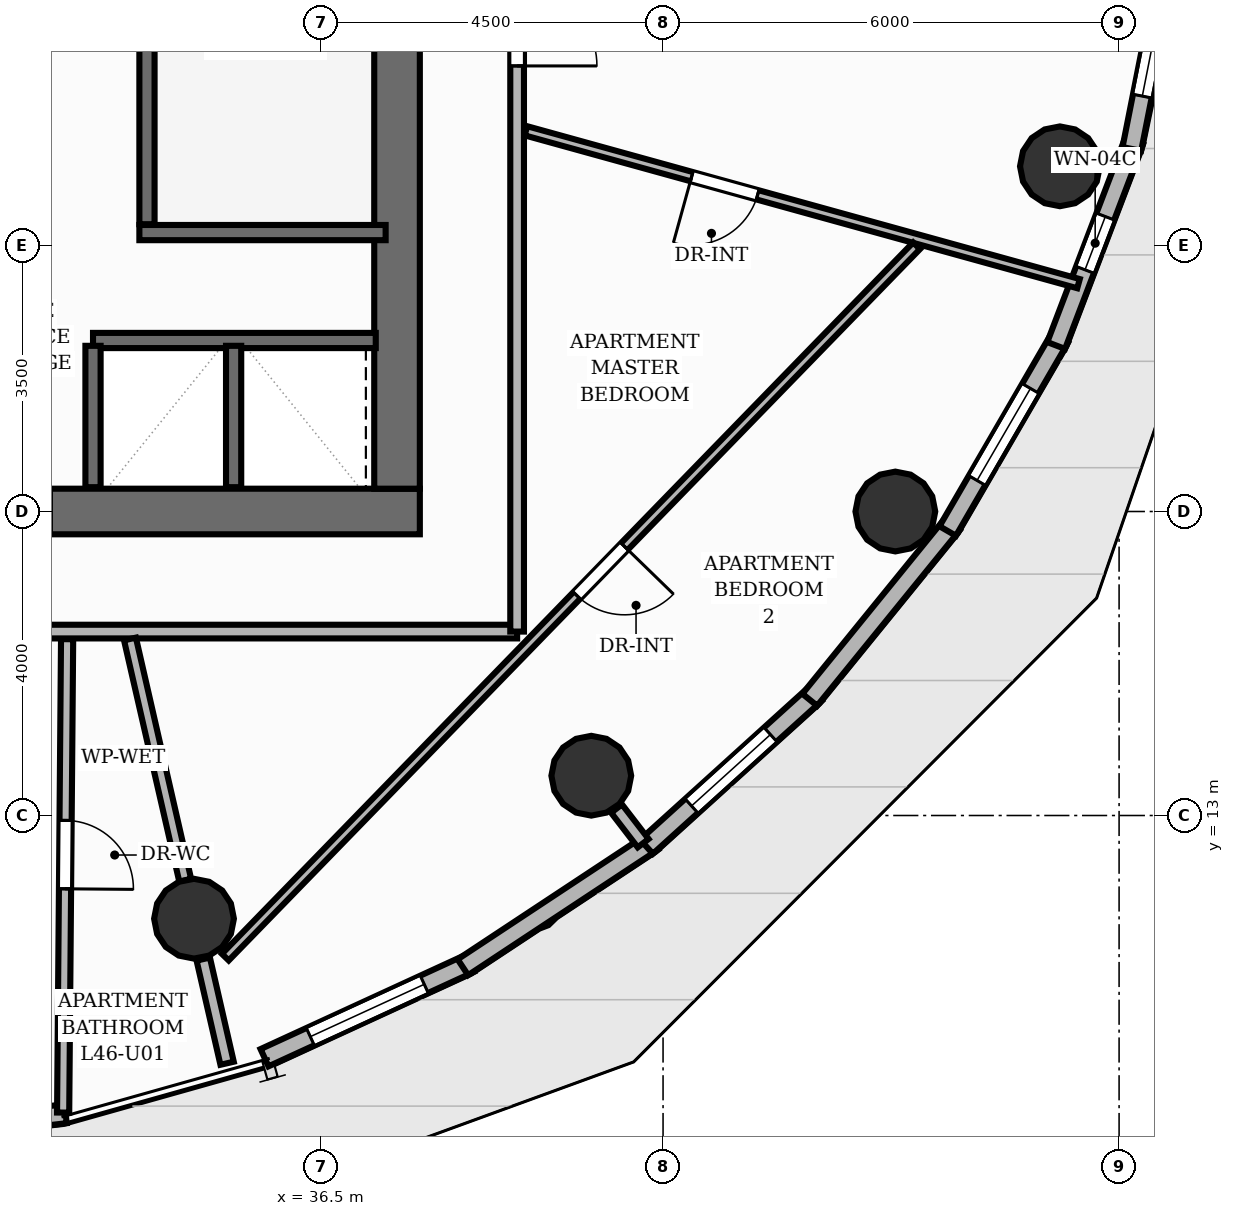
"""IFC4 building model, lengths in metres.
Left out: names, types, materials, properties, quantities, classifications, styles, units other than length and angle.
Written with IfcOpenShell. Run it as: python <this file> out.ifc"""

import sys

from ifc_helpers import new_model, si_unit, direction, frame, frame_2d, origin, origin_2d, place, context, subcontext, project, spatial, rectangle, circle, extrude, element, fill, save


model = new_model("IFC4")
c1 = context("Model", 3, precision=1e-05, world=origin(), true_north=direction((0.0, 1.0)))
c2 = subcontext(c1, "Body", "Model", "MODEL_VIEW")
j1 = project(units=[si_unit("LENGTHUNIT", "METRE"), si_unit("PLANEANGLEUNIT", "RADIAN")], contexts=[c1])
p1 = place(None, origin())
s1 = spatial("IfcSite", under=j1, at=p1, CompositionType="ELEMENT")
p2 = place(p1, origin())
s2 = spatial("IfcBuilding", under=s1, at=p2, CompositionType="ELEMENT")
p3 = place(p2, frame((0.0, 0.0, 155.36)))
s3 = spatial("IfcBuildingStorey", under=s2, at=p3, CompositionType="ELEMENT", Elevation=155.36)
p4 = place(p3, frame((22.7, 17.0, 0.0), z_axis=(0.0, 0.0, 1.0), x_axis=(1.0, 0.0, 0.0)))
e1 = element("IfcWall", 1, at=p4, inside=s3, PredefinedType="SHEAR", context=c2, shape_type="SweptSolid", body=[
    extrude(rectangle(XDim=15.1, YDim=0.6, at=frame_2d((7.55, 0.0))), origin(), (0.0, 0.0, 1.0), 3.2),
])
p5 = place(p4, frame((5.8, 0.0, 0.0)))
e2 = element("IfcOpeningElement", 2, at=p5, cuts=e1, PredefinedType="OPENING", context=c2, shape_type="SweptSolid", body=[
    extrude(rectangle(XDim=1.1, YDim=2.15, at=frame_2d((0.55, 1.075))), frame((0.0, 0.31, 0.0), z_axis=(0.0, -1.0, 0.0), x_axis=(1.0, 0.0, 0.0)), (0.0, 0.0, 1.0), 0.62),
])
p6 = place(p4, frame((9.35, 0.0, 0.0)))
e3 = element("IfcOpeningElement", 3, at=p6, cuts=e1, PredefinedType="OPENING", context=c2, shape_type="SweptSolid", body=[
    extrude(rectangle(XDim=0.9, YDim=2.1, at=frame_2d((0.45, 1.05))), frame((0.0, 0.31, 0.0), z_axis=(0.0, -1.0, 0.0), x_axis=(1.0, 0.0, 0.0)), (0.0, 0.0, 1.0), 0.62),
])
p7 = place(p3, frame((37.5, 17.3, 0.0), z_axis=(0.0, 0.0, 1.0), x_axis=(0.0, 1.0, 0.0)))
e4 = element("IfcWall", 4, at=p7, inside=s3, PredefinedType="SHEAR", context=c2, shape_type="SweptSolid", body=[
    extrude(rectangle(XDim=13.4, YDim=0.6, at=frame_2d((6.7, 0.0))), origin(), (0.0, 0.0, 1.0), 3.2),
])
for number, where, z_axis, x_axis in (
    (5, (34.829, 11.642, 0.0), (0.0, 0.0, 1.0), (1.0, 0.0, 0.0)),
    (6, (40.056, 13.523, 0.0), (0.0, 0.0, 1.0), (1.0, 0.0, 0.0)),
    (7, (44.056, 17.0, 0.0), (0.0, 0.0, 1.0), (1.0, 0.0, 0.0)),
    (8, (46.221, 21.542, 0.0), (0.0, 0.0, 1.0), (1.0, 0.0, 0.0)),
):
    element("IfcColumn", number, at=place(p3, frame(where, z_axis=z_axis, x_axis=x_axis)), inside=s3, PredefinedType="COLUMN", context=c2, shape_type="SweptSolid", body=[
        extrude(circle(Radius=0.525, at=origin_2d()), origin(), (0.0, 0.0, 1.0), 3.2),
    ])
p8 = place(p3, frame((33.14, 9.076, 0.0), z_axis=(0.0, 0.0, 1.0), x_axis=(-0.993631150985, -0.112681568111, 0.0)))
e9 = element("IfcWall", 9, at=p8, inside=s3, PredefinedType="SOLIDWALL", context=c2, shape_type="SweptSolid", body=[
    extrude(rectangle(XDim=2.882, YDim=0.25, at=frame_2d((1.441, 0.0))), origin(), (0.0, 0.0, 1.0), 2.8),
])
p9 = place(p8, frame((0.866, 0.0, 0.0)))
e10 = element("IfcOpeningElement", 10, at=p9, cuts=e9, PredefinedType="OPENING", context=c2, shape_type="SweptSolid", body=[
    extrude(rectangle(XDim=1.15, YDim=2.2, at=frame_2d((0.575, 1.1))), frame((0.0, 0.135, 0.0), z_axis=(0.0, -1.0, 0.0), x_axis=(1.0, 0.0, 0.0)), (0.0, 0.0, 1.0), 0.27),
])
p10 = place(p3, frame((38.461, 11.056, 0.0), z_axis=(0.0, 0.0, 1.0), x_axis=(-0.908594420046, -0.417679518124, 0.0)))
e11 = element("IfcWall", 11, at=p10, inside=s3, PredefinedType="SOLIDWALL", context=c2, shape_type="SweptSolid", body=[
    extrude(rectangle(XDim=2.977, YDim=0.25, at=frame_2d((1.489, 0.0))), origin(), (0.0, 0.0, 1.0), 2.8),
])
p11 = place(p10, frame((0.664, 0.0, 0.85)))
e12 = element("IfcOpeningElement", 12, at=p11, cuts=e11, PredefinedType="OPENING", context=c2, shape_type="SweptSolid", body=[
    extrude(rectangle(XDim=1.65, YDim=1.55, at=frame_2d((0.825, 0.775))), frame((0.0, 0.135, 0.0), z_axis=(0.0, -1.0, 0.0), x_axis=(1.0, 0.0, 0.0)), (0.0, 0.0, 1.0), 0.27),
])
p12 = place(p3, frame((40.868, 12.656, 0.0), z_axis=(0.0, 0.0, 1.0), x_axis=(-0.83436073477, -0.551218798912, 0.0)))
e13 = element("IfcWall", 13, at=p12, inside=s3, PredefinedType="SOLIDWALL", context=c2, shape_type="SweptSolid", body=[
    extrude(rectangle(XDim=2.998, YDim=0.25, at=frame_2d((1.499, 0.0))), origin(), (0.0, 0.0, 1.0), 2.8),
])
p13 = place(p3, frame((43.005, 14.602, 0.0), z_axis=(0.0, 0.0, 1.0), x_axis=(-0.741367932595, -0.671098791922, 0.0)))
e14 = element("IfcWall", 14, at=p13, inside=s3, PredefinedType="SOLIDWALL", context=c2, shape_type="SweptSolid", body=[
    extrude(rectangle(XDim=2.998, YDim=0.25, at=frame_2d((1.499, 0.0))), origin(), (0.0, 0.0, 1.0), 2.8),
])
p14 = place(p13, frame((0.799, 0.0, 0.85)))
e15 = element("IfcOpeningElement", 15, at=p14, cuts=e14, PredefinedType="OPENING", context=c2, shape_type="SweptSolid", body=[
    extrude(rectangle(XDim=1.4, YDim=1.55, at=frame_2d((0.7, 0.775))), frame((0.0, 0.135, 0.0), z_axis=(0.0, -1.0, 0.0), x_axis=(1.0, 0.0, 0.0)), (0.0, 0.0, 1.0), 0.27),
])
p15 = place(p3, frame((44.807, 16.833, 0.0), z_axis=(0.0, 0.0, 1.0), x_axis=(-0.630478385784, -0.776206805599, 0.0)))
e16 = element("IfcWall", 16, at=p15, inside=s3, PredefinedType="SOLIDWALL", context=c2, shape_type="SweptSolid", body=[
    extrude(rectangle(XDim=2.977, YDim=0.25, at=frame_2d((1.489, 0.0))), origin(), (0.0, 0.0, 1.0), 2.8),
])
p16 = place(p3, frame((46.219, 19.283, 0.0), z_axis=(0.0, 0.0, 1.0), x_axis=(-0.502009170613, -0.864862296912, 0.0)))
e17 = element("IfcWall", 17, at=p16, inside=s3, PredefinedType="SOLIDWALL", context=c2, shape_type="SweptSolid", body=[
    extrude(rectangle(XDim=2.937, YDim=0.25, at=frame_2d((1.469, 0.0))), origin(), (0.0, 0.0, 1.0), 2.8),
])
p17 = place(p16, frame((0.768, 0.0, 0.85)))
e18 = element("IfcOpeningElement", 18, at=p17, cuts=e17, PredefinedType="OPENING", context=c2, shape_type="SweptSolid", body=[
    extrude(rectangle(XDim=1.4, YDim=1.55, at=frame_2d((0.7, 0.775))), frame((0.0, 0.135, 0.0), z_axis=(0.0, -1.0, 0.0), x_axis=(1.0, 0.0, 0.0)), (0.0, 0.0, 1.0), 0.27),
])
p18 = place(p3, frame((47.198, 21.877, 0.0), z_axis=(0.0, 0.0, 1.0), x_axis=(-0.356178525313, -0.934417924756, 0.0)))
e19 = element("IfcWall", 19, at=p18, inside=s3, PredefinedType="SOLIDWALL", context=c2, shape_type="SweptSolid", body=[
    extrude(rectangle(XDim=2.882, YDim=0.25, at=frame_2d((1.441, 0.0))), origin(), (0.0, 0.0, 1.0), 2.8),
])
p19 = place(p18, frame((1.066, 0.0, 0.85)))
e20 = element("IfcOpeningElement", 20, at=p19, cuts=e19, PredefinedType="OPENING", context=c2, shape_type="SweptSolid", body=[
    extrude(rectangle(XDim=0.75, YDim=1.55, at=frame_2d((0.375, 0.775))), frame((0.0, 0.135, 0.0), z_axis=(0.0, -1.0, 0.0), x_axis=(1.0, 0.0, 0.0)), (0.0, 0.0, 1.0), 0.27),
])
p20 = place(p3, frame((47.715, 24.534, 0.0), z_axis=(0.0, 0.0, 1.0), x_axis=(-0.194099406303, -0.980981865517, 0.0)))
e21 = element("IfcWall", 21, at=p20, inside=s3, PredefinedType="SOLIDWALL", context=c2, shape_type="SweptSolid", body=[
    extrude(rectangle(XDim=2.817, YDim=0.25, at=frame_2d((1.409, 0.0))), origin(), (0.0, 0.0, 1.0), 2.8),
])
p21 = place(p20, frame((0.709, 0.0, 0.85)))
e22 = element("IfcOpeningElement", 22, at=p21, cuts=e21, PredefinedType="OPENING", context=c2, shape_type="SweptSolid", body=[
    extrude(rectangle(XDim=1.4, YDim=1.55, at=frame_2d((0.7, 0.775))), frame((0.0, 0.135, 0.0), z_axis=(0.0, -1.0, 0.0), x_axis=(1.0, 0.0, 0.0)), (0.0, 0.0, 1.0), 0.27),
])
p22 = place(p3, frame((34.21, 20.78, 0.0), z_axis=(0.0, 0.0, 1.0), x_axis=(0.0, 1.0, 0.0)))
e23 = element("IfcWall", 23, at=p22, inside=s3, PredefinedType="SHEAR", context=c2, shape_type="SweptSolid", body=[
    extrude(rectangle(XDim=6.44, YDim=0.2, at=frame_2d((3.22, 0.0))), origin(), (0.0, 0.0, 1.0), 3.2),
])
p23 = place(p3, frame((34.11, 20.67, 0.0), z_axis=(0.0, 0.0, 1.0), x_axis=(1.0, 0.0, 0.0)))
e24 = element("IfcWall", 24, at=p23, inside=s3, PredefinedType="SHEAR", context=c2, shape_type="SweptSolid", body=[
    extrude(rectangle(XDim=3.24, YDim=0.2, at=frame_2d((1.62, 0.0))), origin(), (0.0, 0.0, 1.0), 3.2),
])
p24 = place(p3, frame((33.5, 19.25, 0.0), z_axis=(0.0, 0.0, 1.0), x_axis=(1.0, 0.0, 0.0)))
e25 = element("IfcWall", 25, at=p24, inside=s3, PredefinedType="SHEAR", context=c2, shape_type="SweptSolid", body=[
    extrude(rectangle(XDim=3.72, YDim=0.2, at=frame_2d((1.86, 0.0))), origin(), (0.0, 0.0, 1.0), 3.2),
])
for number, where, z_axis, x_axis in (
    (26, (33.5, 17.32, 0.0), (0.0, 0.0, 1.0), (0.0, 1.0, 0.0)),
    (27, (35.35, 17.32, 0.0), (0.0, 0.0, 1.0), (0.0, 1.0, 0.0)),
):
    element("IfcWall", number, at=place(p3, frame(where, z_axis=z_axis, x_axis=x_axis)), inside=s3, PredefinedType="SHEAR", context=c2, shape_type="SweptSolid", body=[
        extrude(rectangle(XDim=1.86, YDim=0.2, at=frame_2d((0.93, 0.0))), origin(), (0.0, 0.0, 1.0), 3.2),
    ])
p25 = place(p3, frame((34.95, 11.111, 0.0), z_axis=(0.0, 0.0, 1.0), x_axis=(0.223121817242, -0.974790569646, 0.0)))
e28 = element("IfcWall", 28, at=p25, inside=s3, PredefinedType="PARTITIONING", context=c2, shape_type="SweptSolid", body=[
    extrude(rectangle(XDim=1.406, YDim=0.18, at=frame_2d((0.703, 0.0))), origin(), (0.0, 0.0, 1.0), 2.176),
])
p26 = place(p3, frame((40.388, 13.092, 0.0), z_axis=(0.0, 0.0, 1.0), x_axis=(0.609608105511, -0.79270294417, 0.0)))
e29 = element("IfcWall", 29, at=p26, inside=s3, PredefinedType="PARTITIONING", context=c2, shape_type="SweptSolid", body=[
    extrude(rectangle(XDim=0.575, YDim=0.18, at=frame_2d((0.287, 0.0))), origin(), (0.0, 0.0, 1.0), 2.176),
])
p27 = place(p3, frame((39.08, 15.42, 0.0), z_axis=(0.0, 0.0, 1.0), x_axis=(-1.0, 0.0, 0.0)))
e30 = element("IfcWall", 30, at=p27, inside=s3, PredefinedType="PARTITIONING", context=c2, shape_type="SweptSolid", body=[
    extrude(rectangle(XDim=16.531, YDim=0.18, at=frame_2d((8.266, 0.0))), origin(), (0.0, 0.0, 1.0), 2.795),
])
p28 = place(p27, frame((6.994, 0.0, 0.0)))
e31 = element("IfcOpeningElement", 31, at=p28, cuts=e30, PredefinedType="OPENING", context=c2, shape_type="SweptSolid", body=[
    extrude(rectangle(XDim=1.05, YDim=2.15, at=frame_2d((0.525, 1.075))), frame((0.0, 0.1, 0.0), z_axis=(0.0, -1.0, 0.0), x_axis=(1.0, 0.0, 0.0)), (0.0, 0.0, 1.0), 0.2),
])
p29 = place(p3, frame((39.08, 32.58, 0.0), z_axis=(0.0, 0.0, 1.0), x_axis=(0.0, -1.0, 0.0)))
e32 = element("IfcWall", 32, at=p29, inside=s3, PredefinedType="PARTITIONING", context=c2, shape_type="SweptSolid", body=[
    extrude(rectangle(XDim=17.16, YDim=0.18, at=frame_2d((8.58, 0.0))), origin(), (0.0, 0.0, 1.0), 2.795),
])
p30 = place(p29, frame((8.667, 0.0, 0.0)))
e33 = element("IfcOpeningElement", 33, at=p30, cuts=e32, PredefinedType="OPENING", context=c2, shape_type="SweptSolid", body=[
    extrude(rectangle(XDim=1.05, YDim=2.15, at=frame_2d((0.525, 1.075))), frame((0.0, 0.1, 0.0), z_axis=(0.0, -1.0, 0.0), x_axis=(1.0, 0.0, 0.0)), (0.0, 0.0, 1.0), 0.2),
])
p31 = place(p29, frame((2.284, 0.0, 0.0)))
e34 = element("IfcOpeningElement", 34, at=p31, cuts=e32, PredefinedType="OPENING", context=c2, shape_type="SweptSolid", body=[
    extrude(rectangle(XDim=0.9, YDim=2.1, at=frame_2d((0.45, 1.05))), frame((0.0, 0.1, 0.0), z_axis=(0.0, -1.0, 0.0), x_axis=(1.0, 0.0, 0.0)), (0.0, 0.0, 1.0), 0.2),
])
p32 = place(p3, frame((33.159, 15.32, 0.0), z_axis=(0.0, 0.0, 1.0), x_axis=(-0.008387256911, -0.999964826342, 0.0)))
e35 = element("IfcWall", 35, at=p32, inside=s3, PredefinedType="PLUMBINGWALL", context=c2, shape_type="SweptSolid", body=[
    extrude(rectangle(XDim=6.229, YDim=0.16, at=frame_2d((3.115, 0.0))), origin(), (0.0, 0.0, 1.0), 2.795),
])
p33 = place(p32, frame((2.385, 0.0, 0.0)))
e36 = element("IfcOpeningElement", 36, at=p33, cuts=e35, PredefinedType="OPENING", context=c2, shape_type="SweptSolid", body=[
    extrude(rectangle(XDim=0.9, YDim=2.1, at=frame_2d((0.45, 1.05))), frame((0.0, 0.09, 0.0), z_axis=(0.0, -1.0, 0.0), x_axis=(1.0, 0.0, 0.0)), (0.0, 0.0, 1.0), 0.18),
])
p34 = place(p3, frame((33.986, 15.323, 0.0), z_axis=(0.0, 0.0, 1.0), x_axis=(0.223166862669, -0.97478025801, 0.0)))
e37 = element("IfcWall", 37, at=p34, inside=s3, PredefinedType="PLUMBINGWALL", context=c2, shape_type="SweptSolid", body=[
    extrude(rectangle(XDim=3.256, YDim=0.16, at=frame_2d((1.628, 0.0))), origin(), (0.0, 0.0, 1.0), 2.176),
])
p35 = place(p3, frame((46.466, 19.998, 0.0), z_axis=(0.0, 0.0, 1.0), x_axis=(-0.963794664313, 0.26664554195, 0.0)))
e38 = element("IfcWall", 38, at=p35, inside=s3, PredefinedType="PARTITIONING", context=c2, shape_type="SweptSolid", body=[
    extrude(rectangle(XDim=7.544, YDim=0.125, at=frame_2d((3.772, 0.0))), origin(), (0.0, 0.0, 1.0), 2.532),
])
p36 = place(p35, frame((4.381, 0.0, 0.0)))
e39 = element("IfcOpeningElement", 39, at=p36, cuts=e38, PredefinedType="OPENING", context=c2, shape_type="SweptSolid", body=[
    extrude(rectangle(XDim=0.9, YDim=2.1, at=frame_2d((0.45, 1.05))), frame((0.0, 0.073, 0.0), z_axis=(0.0, -1.0, 0.0), x_axis=(1.0, 0.0, 0.0)), (0.0, 0.0, 1.0), 0.145),
])
p37 = place(p3, frame((44.336, 20.497, 0.0), z_axis=(0.0, 0.0, 1.0), x_axis=(-0.696857448942, -0.717209659621, 0.0)))
e40 = element("IfcWall", 40, at=p37, inside=s3, PredefinedType="PARTITIONING", context=c2, shape_type="SweptSolid", body=[
    extrude(rectangle(XDim=13.052, YDim=0.125, at=frame_2d((6.526, 0.0))), origin(), (0.0, 0.0, 1.0), 2.251),
])
p38 = place(p37, frame((5.516, 0.0, 0.0)))
e41 = element("IfcOpeningElement", 41, at=p38, cuts=e40, PredefinedType="OPENING", context=c2, shape_type="SweptSolid", body=[
    extrude(rectangle(XDim=0.9, YDim=2.1, at=frame_2d((0.45, 1.05))), frame((0.0, 0.073, 0.0), z_axis=(0.0, -1.0, 0.0), x_axis=(1.0, 0.0, 0.0)), (0.0, 0.0, 1.0), 0.145),
])
p39 = place(p11, origin())
e42 = element("IfcWindow", 42, at=p39, inside=s3, PartitioningType="SINGLE_PANEL", PredefinedType="WINDOW", context=c2, shape_type="SweptSolid", body=[
    extrude(rectangle(XDim=1.65, YDim=1.55, at=frame_2d((0.825, 0.775))), frame((0.0, 0.03, 0.0), z_axis=(0.0, -1.0, 0.0), x_axis=(1.0, 0.0, 0.0)), (0.0, 0.0, 1.0), 0.06),
])
fill(e12, e42)
p40 = place(p14, origin())
e43 = element("IfcWindow", 43, at=p40, inside=s3, PartitioningType="SINGLE_PANEL", PredefinedType="WINDOW", context=c2, shape_type="SweptSolid", body=[
    extrude(rectangle(XDim=1.4, YDim=1.55, at=frame_2d((0.7, 0.775))), frame((0.0, 0.03, 0.0), z_axis=(0.0, -1.0, 0.0), x_axis=(1.0, 0.0, 0.0)), (0.0, 0.0, 1.0), 0.06),
])
fill(e15, e43)
p41 = place(p17, origin())
e44 = element("IfcWindow", 44, at=p41, inside=s3, PartitioningType="SINGLE_PANEL", PredefinedType="WINDOW", context=c2, shape_type="SweptSolid", body=[
    extrude(rectangle(XDim=1.4, YDim=1.55, at=frame_2d((0.7, 0.775))), frame((0.0, 0.03, 0.0), z_axis=(0.0, -1.0, 0.0), x_axis=(1.0, 0.0, 0.0)), (0.0, 0.0, 1.0), 0.06),
])
fill(e18, e44)
p42 = place(p19, origin())
e45 = element("IfcWindow", 45, at=p42, inside=s3, PartitioningType="SINGLE_PANEL", PredefinedType="WINDOW", context=c2, shape_type="SweptSolid", body=[
    extrude(rectangle(XDim=0.75, YDim=1.55, at=frame_2d((0.375, 0.775))), frame((0.0, 0.03, 0.0), z_axis=(0.0, -1.0, 0.0), x_axis=(1.0, 0.0, 0.0)), (0.0, 0.0, 1.0), 0.06),
])
fill(e20, e45)
p43 = place(p21, origin())
e46 = element("IfcWindow", 46, at=p43, inside=s3, PartitioningType="SINGLE_PANEL", PredefinedType="WINDOW", context=c2, shape_type="SweptSolid", body=[
    extrude(rectangle(XDim=1.4, YDim=1.55, at=frame_2d((0.7, 0.775))), frame((0.0, 0.03, 0.0), z_axis=(0.0, -1.0, 0.0), x_axis=(1.0, 0.0, 0.0)), (0.0, 0.0, 1.0), 0.06),
])
fill(e22, e46)
p44 = place(p33, origin())
e47 = element("IfcDoor", 47, at=p44, inside=s3, OperationType="SINGLE_SWING_RIGHT", PredefinedType="DOOR", context=c2, shape_type="SweptSolid", body=[
    extrude(rectangle(XDim=0.9, YDim=2.1, at=frame_2d((0.45, 1.05))), frame((0.0, 0.025, 0.0), z_axis=(0.0, -1.0, 0.0), x_axis=(1.0, 0.0, 0.0)), (0.0, 0.0, 1.0), 0.05),
])
fill(e36, e47)
p45 = place(p30, origin())
e48 = element("IfcDoor", 48, at=p45, inside=s3, OperationType="SINGLE_SWING_RIGHT", PredefinedType="DOOR", context=c2, shape_type="SweptSolid", body=[
    extrude(rectangle(XDim=1.05, YDim=2.15, at=frame_2d((0.525, 1.075))), frame((0.0, 0.025, 0.0), z_axis=(0.0, -1.0, 0.0), x_axis=(1.0, 0.0, 0.0)), (0.0, 0.0, 1.0), 0.05),
])
fill(e33, e48)
p46 = place(p36, origin())
e49 = element("IfcDoor", 49, at=p46, inside=s3, OperationType="SINGLE_SWING_RIGHT", PredefinedType="DOOR", context=c2, shape_type="SweptSolid", body=[
    extrude(rectangle(XDim=0.9, YDim=2.1, at=frame_2d((0.45, 1.05))), frame((0.0, 0.025, 0.0), z_axis=(0.0, -1.0, 0.0), x_axis=(1.0, 0.0, 0.0)), (0.0, 0.0, 1.0), 0.05),
])
fill(e39, e49)
p47 = place(p38, origin())
e50 = element("IfcDoor", 50, at=p47, inside=s3, OperationType="SINGLE_SWING_LEFT", PredefinedType="DOOR", context=c2, shape_type="SweptSolid", body=[
    extrude(rectangle(XDim=0.9, YDim=2.1, at=frame_2d((0.45, 1.05))), frame((0.0, 0.025, 0.0), z_axis=(0.0, -1.0, 0.0), x_axis=(1.0, 0.0, 0.0)), (0.0, 0.0, 1.0), 0.05),
])
fill(e41, e50)
save(model, sys.argv[1])
